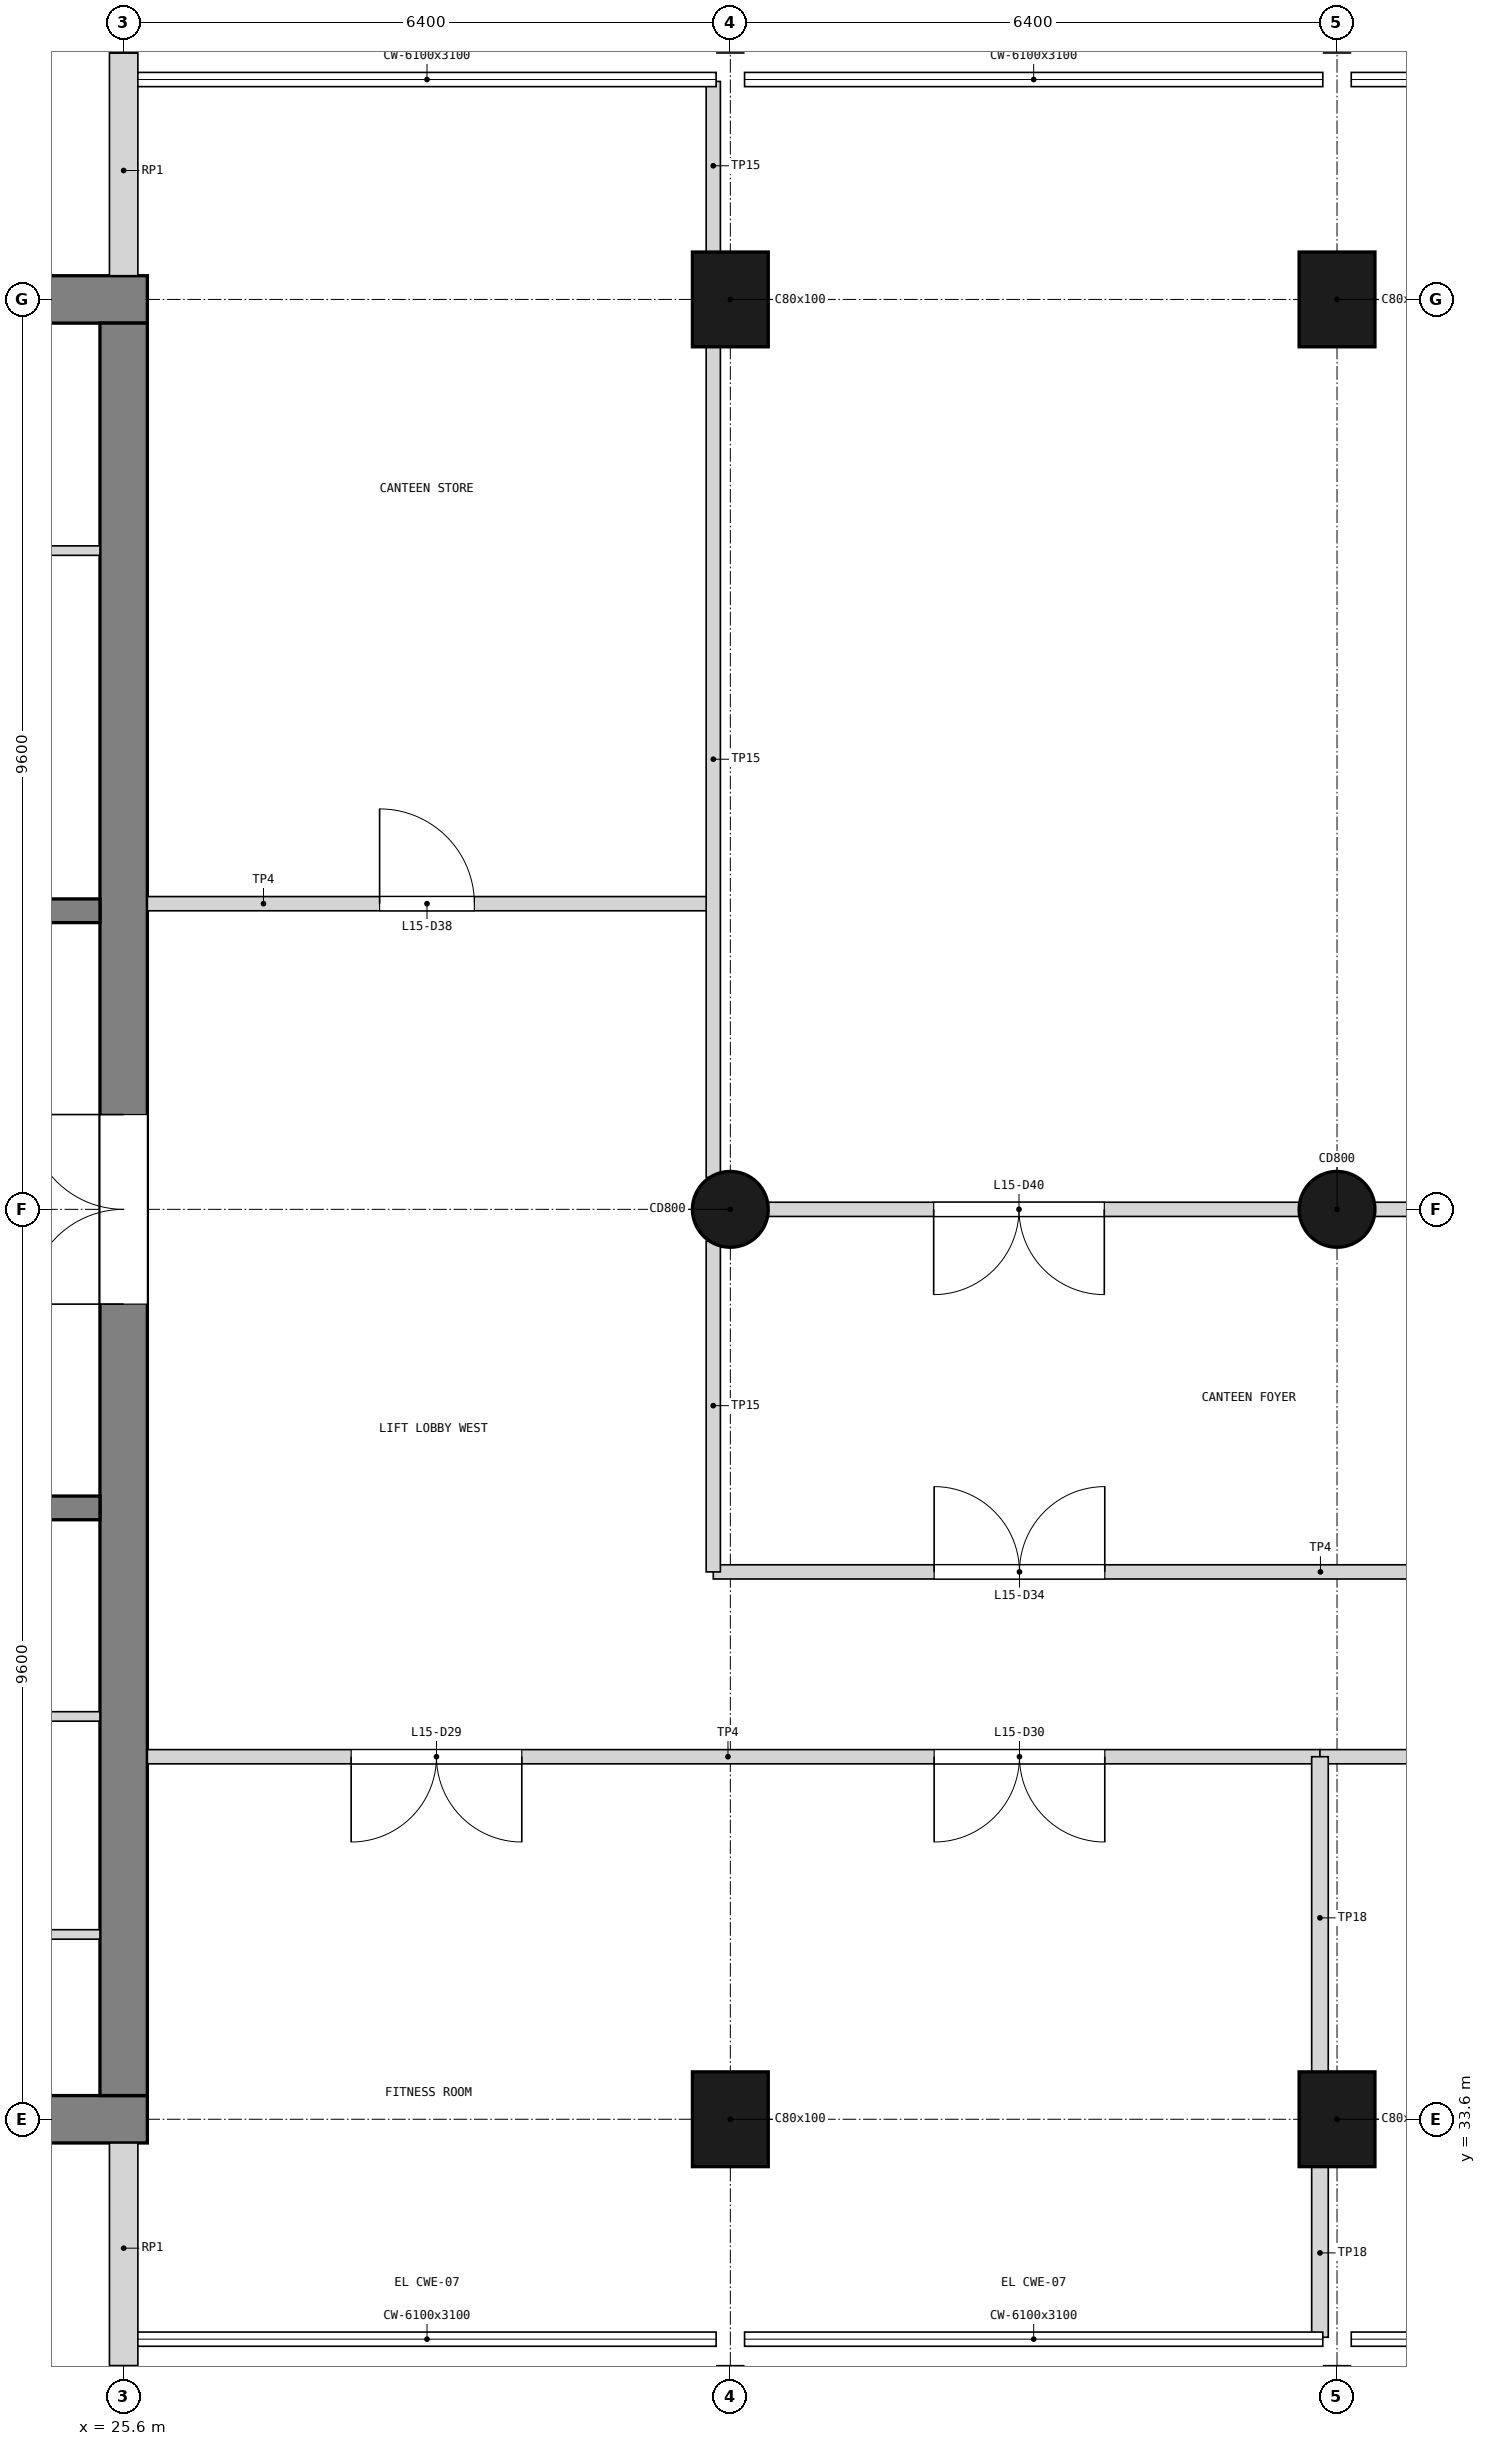
"""IFC4 building model, lengths in metres.
Left out: names, types, materials, properties, quantities, classifications, styles, units other than length and angle.
Written with IfcOpenShell. Run it as: python <this file> out.ifc"""

import sys

from ifc_helpers import new_model, si_unit, direction, frame, frame_2d, origin, origin_2d, place, context, subcontext, project, spatial, rectangle, circle, extrude, element, fill, save


model = new_model("IFC4")
c1 = context("Model", 3, precision=1e-05, world=origin(), true_north=direction((0.0, 1.0)))
c2 = subcontext(c1, "Body", "Model", "MODEL_VIEW")
j1 = project(units=[si_unit("LENGTHUNIT", "METRE"), si_unit("PLANEANGLEUNIT", "RADIAN")], contexts=[c1])
p1 = place(None, origin())
s1 = spatial("IfcSite", under=j1, at=p1, CompositionType="ELEMENT")
p2 = place(p1, origin())
s2 = spatial("IfcBuilding", under=s1, at=p2, CompositionType="ELEMENT")
p3 = place(p2, frame((0.0, 0.0, 60.0)))
s3 = spatial("IfcBuildingStorey", under=s2, at=p3, CompositionType="ELEMENT", Elevation=60.0)
p4 = place(p3, frame((12.55, 52.8, 0.0), z_axis=(0.0, 0.0, 1.0), x_axis=(1.0, 0.0, 0.0)))
e1 = element("IfcWall", 1, at=p4, inside=s3, PredefinedType="SHEAR", context=c2, shape_type="SweptSolid", body=[
    extrude(rectangle(XDim=13.3, YDim=0.5, at=frame_2d((6.65, 0.0))), origin(), (0.0, 0.0, 1.0), 4.2),
])
p5 = place(p4, frame((1.85, 0.0, 1.0)))
e2 = element("IfcOpeningElement", 2, at=p5, cuts=e1, PredefinedType="OPENING", context=c2, shape_type="SweptSolid", body=[
    extrude(rectangle(XDim=0.4, YDim=2.0, at=frame_2d((0.2, 1.0))), frame((0.0, 0.26, 0.0), z_axis=(0.0, -1.0, 0.0), x_axis=(1.0, 0.0, 0.0)), (0.0, 0.0, 1.0), 0.52),
])
p6 = place(p3, frame((12.55, 33.6, 0.0), z_axis=(0.0, 0.0, 1.0), x_axis=(1.0, 0.0, 0.0)))
e3 = element("IfcWall", 3, at=p6, inside=s3, PredefinedType="SHEAR", context=c2, shape_type="SweptSolid", body=[
    extrude(rectangle(XDim=13.3, YDim=0.5, at=frame_2d((6.65, 0.0))), origin(), (0.0, 0.0, 1.0), 4.2),
])
p7 = place(p6, frame((1.85, 0.0, 1.0)))
e4 = element("IfcOpeningElement", 4, at=p7, cuts=e3, PredefinedType="OPENING", context=c2, shape_type="SweptSolid", body=[
    extrude(rectangle(XDim=0.4, YDim=2.0, at=frame_2d((0.2, 1.0))), frame((0.0, 0.26, 0.0), z_axis=(0.0, -1.0, 0.0), x_axis=(1.0, 0.0, 0.0)), (0.0, 0.0, 1.0), 0.52),
])
p8 = place(p3, frame((25.6, 33.85, 0.0), z_axis=(0.0, 0.0, 1.0), x_axis=(0.0, 1.0, 0.0)))
e5 = element("IfcWall", 5, at=p8, inside=s3, PredefinedType="SHEAR", context=c2, shape_type="SweptSolid", body=[
    extrude(rectangle(XDim=18.7, YDim=0.5, at=frame_2d((9.35, 0.0))), origin(), (0.0, 0.0, 1.0), 4.2),
])
p9 = place(p8, frame((8.35, 0.0, 0.0)))
e6 = element("IfcOpeningElement", 6, at=p9, cuts=e5, PredefinedType="OPENING", context=c2, shape_type="SweptSolid", body=[
    extrude(rectangle(XDim=2.0, YDim=2.1, at=frame_2d((1.0, 1.05))), frame((0.0, 0.26, 0.0), z_axis=(0.0, -1.0, 0.0), x_axis=(1.0, 0.0, 0.0)), (0.0, 0.0, 1.0), 0.52),
])
p10 = place(p3, frame((32.0, 33.6, 0.0), z_axis=(0.0, 0.0, 1.0), x_axis=(1.0, 0.0, 0.0)))
e7 = element("IfcColumn", 7, at=p10, inside=s3, PredefinedType="COLUMN", context=c2, shape_type="SweptSolid", body=[
    extrude(rectangle(XDim=0.8, YDim=1.0, at=origin_2d()), origin(), (0.0, 0.0, 1.0), 4.2),
])
p11 = place(p3, frame((32.0, 43.2, 0.0), z_axis=(0.0, 0.0, 1.0), x_axis=(1.0, 0.0, 0.0)))
e8 = element("IfcColumn", 8, at=p11, inside=s3, PredefinedType="COLUMN", context=c2, shape_type="SweptSolid", body=[
    extrude(circle(Radius=0.4, at=origin_2d()), origin(), (0.0, 0.0, 1.0), 4.2),
])
for number, where, z_axis, x_axis in (
    (9, (32.0, 52.8, 0.0), (0.0, 0.0, 1.0), (1.0, 0.0, 0.0)),
    (10, (38.4, 33.6, 0.0), (0.0, 0.0, 1.0), (1.0, 0.0, 0.0)),
):
    element("IfcColumn", number, at=place(p3, frame(where, z_axis=z_axis, x_axis=x_axis)), inside=s3, PredefinedType="COLUMN", context=c2, shape_type="SweptSolid", body=[
        extrude(rectangle(XDim=0.8, YDim=1.0, at=origin_2d()), origin(), (0.0, 0.0, 1.0), 4.2),
    ])
p12 = place(p3, frame((38.4, 43.2, 0.0), z_axis=(0.0, 0.0, 1.0), x_axis=(1.0, 0.0, 0.0)))
e11 = element("IfcColumn", 11, at=p12, inside=s3, PredefinedType="COLUMN", context=c2, shape_type="SweptSolid", body=[
    extrude(circle(Radius=0.4, at=origin_2d()), origin(), (0.0, 0.0, 1.0), 4.2),
])
p13 = place(p3, frame((38.4, 52.8, 0.0), z_axis=(0.0, 0.0, 1.0), x_axis=(1.0, 0.0, 0.0)))
e12 = element("IfcColumn", 12, at=p13, inside=s3, PredefinedType="COLUMN", context=c2, shape_type="SweptSolid", body=[
    extrude(rectangle(XDim=0.8, YDim=1.0, at=origin_2d()), origin(), (0.0, 0.0, 1.0), 4.2),
])
p14 = place(p3, frame((25.6, 31.0, 0.0), z_axis=(0.0, 0.0, 1.0), x_axis=(0.0, 1.0, 0.0)))
e13 = element("IfcWall", 13, at=p14, inside=s3, PredefinedType="SOLIDWALL", context=c2, shape_type="SweptSolid", body=[
    extrude(rectangle(XDim=2.35, YDim=0.3, at=frame_2d((1.175, 0.0))), origin(), (0.0, 0.0, 1.0), 3.1),
])
p15 = place(p3, frame((25.6, 53.05, 0.0), z_axis=(0.0, 0.0, 1.0), x_axis=(0.0, 1.0, 0.0)))
e14 = element("IfcWall", 14, at=p15, inside=s3, PredefinedType="SOLIDWALL", context=c2, shape_type="SweptSolid", body=[
    extrude(rectangle(XDim=2.35, YDim=0.3, at=frame_2d((1.175, 0.0))), origin(), (0.0, 0.0, 1.0), 3.1),
])
for number, where, z_axis, x_axis in (
    (15, (19.875, 40.05, 0.0), (0.0, 0.0, 1.0), (1.0, 0.0, 0.0)),
    (16, (19.875, 46.35, 0.0), (0.0, 0.0, 1.0), (1.0, 0.0, 0.0)),
):
    element("IfcWall", number, at=place(p3, frame(where, z_axis=z_axis, x_axis=x_axis)), inside=s3, PredefinedType="SOLIDWALL", context=c2, shape_type="SweptSolid", body=[
        extrude(rectangle(XDim=5.475, YDim=0.25, at=frame_2d((2.738, 0.0))), origin(), (0.0, 0.0, 1.0), 3.9),
    ])
p16 = place(p3, frame((20.125, 35.55, 0.0), z_axis=(0.0, 0.0, 1.0), x_axis=(1.0, 0.0, 0.0)))
e17 = element("IfcWall", 17, at=p16, inside=s3, PredefinedType="PARTITIONING", context=c2, shape_type="SweptSolid", body=[
    extrude(rectangle(XDim=5.225, YDim=0.1, at=frame_2d((2.613, 0.0))), origin(), (0.0, 0.0, 1.0), 3.9),
])
p17 = place(p3, frame((21.675, 37.85, 0.0), z_axis=(0.0, 0.0, 1.0), x_axis=(1.0, 0.0, 0.0)))
e18 = element("IfcWall", 18, at=p17, inside=s3, PredefinedType="PARTITIONING", context=c2, shape_type="SweptSolid", body=[
    extrude(rectangle(XDim=3.675, YDim=0.1, at=frame_2d((1.837, 0.0))), origin(), (0.0, 0.0, 1.0), 3.9),
])
p18 = place(p3, frame((20.125, 50.15, 0.0), z_axis=(0.0, 0.0, 1.0), x_axis=(1.0, 0.0, 0.0)))
e19 = element("IfcWall", 19, at=p18, inside=s3, PredefinedType="PARTITIONING", context=c2, shape_type="SweptSolid", body=[
    extrude(rectangle(XDim=5.225, YDim=0.1, at=frame_2d((2.613, 0.0))), origin(), (0.0, 0.0, 1.0), 3.9),
])
p19 = place(p3, frame((25.85, 37.425, 0.0), z_axis=(0.0, 0.0, 1.0), x_axis=(1.0, 0.0, 0.0)))
e20 = element("IfcWall", 20, at=p19, inside=s3, PredefinedType="PARTITIONING", context=c2, shape_type="SweptSolid", body=[
    extrude(rectangle(XDim=12.37, YDim=0.15, at=frame_2d((6.185, 0.0))), origin(), (0.0, 0.0, 1.0), 3.9),
])
p20 = place(p19, frame((2.15, 0.0, 0.0)))
e21 = element("IfcOpeningElement", 21, at=p20, cuts=e20, PredefinedType="OPENING", context=c2, shape_type="SweptSolid", body=[
    extrude(rectangle(XDim=1.8, YDim=2.1, at=frame_2d((0.9, 1.05))), frame((0.0, 0.085, 0.0), z_axis=(0.0, -1.0, 0.0), x_axis=(1.0, 0.0, 0.0)), (0.0, 0.0, 1.0), 0.17),
])
p21 = place(p19, frame((8.3, 0.0, 0.0)))
e22 = element("IfcOpeningElement", 22, at=p21, cuts=e20, PredefinedType="OPENING", context=c2, shape_type="SweptSolid", body=[
    extrude(rectangle(XDim=1.8, YDim=2.1, at=frame_2d((0.9, 1.05))), frame((0.0, 0.085, 0.0), z_axis=(0.0, -1.0, 0.0), x_axis=(1.0, 0.0, 0.0)), (0.0, 0.0, 1.0), 0.17),
])
p22 = place(p3, frame((38.22, 37.425, 0.0), z_axis=(0.0, 0.0, 1.0), x_axis=(1.0, 0.0, 0.0)))
e23 = element("IfcWall", 23, at=p22, inside=s3, PredefinedType="PARTITIONING", context=c2, shape_type="SweptSolid", body=[
    extrude(rectangle(XDim=6.4, YDim=0.15, at=frame_2d((3.2, 0.0))), origin(), (0.0, 0.0, 1.0), 3.9),
])
p23 = place(p22, frame((2.73, 0.0, 0.0)))
e24 = element("IfcOpeningElement", 24, at=p23, cuts=e23, PredefinedType="OPENING", context=c2, shape_type="SweptSolid", body=[
    extrude(rectangle(XDim=1.0, YDim=2.1, at=frame_2d((0.5, 1.05))), frame((0.0, 0.085, 0.0), z_axis=(0.0, -1.0, 0.0), x_axis=(1.0, 0.0, 0.0)), (0.0, 0.0, 1.0), 0.17),
])
p24 = place(p3, frame((38.22, 31.3, 0.0), z_axis=(0.0, 0.0, 1.0), x_axis=(0.0, 1.0, 0.0)))
e25 = element("IfcWall", 25, at=p24, inside=s3, PredefinedType="PARTITIONING", context=c2, shape_type="SweptSolid", body=[
    extrude(rectangle(XDim=1.82, YDim=0.175, at=frame_2d((0.91, 0.0))), origin(), (0.0, 0.0, 1.0), 3.0),
])
p25 = place(p3, frame((38.22, 34.08, 0.0), z_axis=(0.0, 0.0, 1.0), x_axis=(0.0, 1.0, 0.0)))
e26 = element("IfcWall", 26, at=p25, inside=s3, PredefinedType="PARTITIONING", context=c2, shape_type="SweptSolid", body=[
    extrude(rectangle(XDim=3.345, YDim=0.175, at=frame_2d((1.672, 0.0))), origin(), (0.0, 0.0, 1.0), 3.0),
])
p26 = place(p3, frame((31.82, 39.375, 0.0), z_axis=(0.0, 0.0, 1.0), x_axis=(1.0, 0.0, 0.0)))
e27 = element("IfcWall", 27, at=p26, inside=s3, PredefinedType="PARTITIONING", context=c2, shape_type="SweptSolid", body=[
    extrude(rectangle(XDim=12.8, YDim=0.15, at=frame_2d((6.4, 0.0))), origin(), (0.0, 0.0, 1.0), 3.9),
])
p27 = place(p26, frame((2.33, 0.0, 0.0)))
e28 = element("IfcOpeningElement", 28, at=p27, cuts=e27, PredefinedType="OPENING", context=c2, shape_type="SweptSolid", body=[
    extrude(rectangle(XDim=1.8, YDim=2.1, at=frame_2d((0.9, 1.05))), frame((0.0, 0.085, 0.0), z_axis=(0.0, -1.0, 0.0), x_axis=(1.0, 0.0, 0.0)), (0.0, 0.0, 1.0), 0.17),
])
p28 = place(p26, frame((8.68, 0.0, 0.0)))
e29 = element("IfcOpeningElement", 29, at=p28, cuts=e27, PredefinedType="OPENING", context=c2, shape_type="SweptSolid", body=[
    extrude(rectangle(XDim=1.8, YDim=2.1, at=frame_2d((0.9, 1.05))), frame((0.0, 0.085, 0.0), z_axis=(0.0, -1.0, 0.0), x_axis=(1.0, 0.0, 0.0)), (0.0, 0.0, 1.0), 0.17),
])
p29 = place(p3, frame((31.82, 43.2, 0.0), z_axis=(0.0, 0.0, 1.0), x_axis=(1.0, 0.0, 0.0)))
e30 = element("IfcWall", 30, at=p29, inside=s3, PredefinedType="PARTITIONING", context=c2, shape_type="SweptSolid", body=[
    extrude(rectangle(XDim=25.96, YDim=0.15, at=frame_2d((12.98, 0.0))), origin(), (0.0, 0.0, 1.0), 3.1),
])
p30 = place(p29, frame((2.325, 0.0, 0.0)))
e31 = element("IfcOpeningElement", 31, at=p30, cuts=e30, PredefinedType="OPENING", context=c2, shape_type="SweptSolid", body=[
    extrude(rectangle(XDim=1.8, YDim=2.1, at=frame_2d((0.9, 1.05))), frame((0.0, 0.085, 0.0), z_axis=(0.0, -1.0, 0.0), x_axis=(1.0, 0.0, 0.0)), (0.0, 0.0, 1.0), 0.17),
])
p31 = place(p29, frame((8.675, 0.0, 0.0)))
e32 = element("IfcOpeningElement", 32, at=p31, cuts=e30, PredefinedType="OPENING", context=c2, shape_type="SweptSolid", body=[
    extrude(rectangle(XDim=1.8, YDim=2.1, at=frame_2d((0.9, 1.05))), frame((0.0, 0.085, 0.0), z_axis=(0.0, -1.0, 0.0), x_axis=(1.0, 0.0, 0.0)), (0.0, 0.0, 1.0), 0.17),
])
p32 = place(p29, frame((22.285, 0.0, 0.0)))
e33 = element("IfcOpeningElement", 33, at=p32, cuts=e30, PredefinedType="OPENING", context=c2, shape_type="SweptSolid", body=[
    extrude(rectangle(XDim=1.0, YDim=2.1, at=frame_2d((0.5, 1.05))), frame((0.0, 0.085, 0.0), z_axis=(0.0, -1.0, 0.0), x_axis=(1.0, 0.0, 0.0)), (0.0, 0.0, 1.0), 0.17),
])
p33 = place(p3, frame((25.85, 46.425, 0.0), z_axis=(0.0, 0.0, 1.0), x_axis=(1.0, 0.0, 0.0)))
e34 = element("IfcWall", 34, at=p33, inside=s3, PredefinedType="PARTITIONING", context=c2, shape_type="SweptSolid", body=[
    extrude(rectangle(XDim=5.97, YDim=0.15, at=frame_2d((2.985, 0.0))), origin(), (0.0, 0.0, 1.0), 3.9),
])
p34 = place(p33, frame((2.45, 0.0, 0.0)))
e35 = element("IfcOpeningElement", 35, at=p34, cuts=e34, PredefinedType="OPENING", context=c2, shape_type="SweptSolid", body=[
    extrude(rectangle(XDim=1.0, YDim=2.1, at=frame_2d((0.5, 1.05))), frame((0.0, 0.085, 0.0), z_axis=(0.0, -1.0, 0.0), x_axis=(1.0, 0.0, 0.0)), (0.0, 0.0, 1.0), 0.17),
])
p35 = place(p3, frame((31.82, 39.375, 0.0), z_axis=(0.0, 0.0, 1.0), x_axis=(0.0, 1.0, 0.0)))
e36 = element("IfcWall", 36, at=p35, inside=s3, PredefinedType="PARTITIONING", context=c2, shape_type="SweptSolid", body=[
    extrude(rectangle(XDim=3.488, YDim=0.15, at=frame_2d((1.744, 0.0))), origin(), (0.0, 0.0, 1.0), 3.0),
])
p36 = place(p3, frame((31.82, 43.537, 0.0), z_axis=(0.0, 0.0, 1.0), x_axis=(0.0, 1.0, 0.0)))
e37 = element("IfcWall", 37, at=p36, inside=s3, PredefinedType="PARTITIONING", context=c2, shape_type="SweptSolid", body=[
    extrude(rectangle(XDim=8.783, YDim=0.15, at=frame_2d((4.392, 0.0))), origin(), (0.0, 0.0, 1.0), 3.0),
])
p37 = place(p3, frame((31.82, 53.28, 0.0), z_axis=(0.0, 0.0, 1.0), x_axis=(0.0, 1.0, 0.0)))
e38 = element("IfcWall", 38, at=p37, inside=s3, PredefinedType="PARTITIONING", context=c2, shape_type="SweptSolid", body=[
    extrude(rectangle(XDim=1.82, YDim=0.15, at=frame_2d((0.91, 0.0))), origin(), (0.0, 0.0, 1.0), 3.0),
])
p38 = place(p9, origin())
e39 = element("IfcDoor", 39, at=p38, inside=s3, OperationType="DOUBLE_DOOR_SINGLE_SWING", PredefinedType="DOOR", context=c2, shape_type="SweptSolid", body=[
    extrude(rectangle(XDim=2.0, YDim=2.1, at=frame_2d((1.0, 1.05))), frame((0.0, 0.025, 0.0), z_axis=(0.0, -1.0, 0.0), x_axis=(1.0, 0.0, 0.0)), (0.0, 0.0, 1.0), 0.05),
])
fill(e6, e39)
p39 = place(p20, frame((1.8, 0.0, 0.0), z_axis=(0.0, 0.0, 1.0), x_axis=(-1.0, 0.0, 0.0)))
e40 = element("IfcDoor", 40, at=p39, inside=s3, OperationType="DOUBLE_DOOR_SINGLE_SWING", PredefinedType="DOOR", context=c2, shape_type="SweptSolid", body=[
    extrude(rectangle(XDim=1.8, YDim=2.1, at=frame_2d((0.9, 1.05))), frame((0.0, 0.025, 0.0), z_axis=(0.0, -1.0, 0.0), x_axis=(1.0, 0.0, 0.0)), (0.0, 0.0, 1.0), 0.05),
])
fill(e21, e40)
p40 = place(p21, frame((1.8, 0.0, 0.0), z_axis=(0.0, 0.0, 1.0), x_axis=(-1.0, 0.0, 0.0)))
e41 = element("IfcDoor", 41, at=p40, inside=s3, OperationType="DOUBLE_DOOR_SINGLE_SWING", PredefinedType="DOOR", context=c2, shape_type="SweptSolid", body=[
    extrude(rectangle(XDim=1.8, YDim=2.1, at=frame_2d((0.9, 1.05))), frame((0.0, 0.025, 0.0), z_axis=(0.0, -1.0, 0.0), x_axis=(1.0, 0.0, 0.0)), (0.0, 0.0, 1.0), 0.05),
])
fill(e22, e41)
p41 = place(p27, origin())
e42 = element("IfcDoor", 42, at=p41, inside=s3, OperationType="DOUBLE_DOOR_SINGLE_SWING", PredefinedType="DOOR", context=c2, shape_type="SweptSolid", body=[
    extrude(rectangle(XDim=1.8, YDim=2.1, at=frame_2d((0.9, 1.05))), frame((0.0, 0.025, 0.0), z_axis=(0.0, -1.0, 0.0), x_axis=(1.0, 0.0, 0.0)), (0.0, 0.0, 1.0), 0.05),
])
fill(e28, e42)
p42 = place(p34, origin())
e43 = element("IfcDoor", 43, at=p42, inside=s3, OperationType="SINGLE_SWING_LEFT", PredefinedType="DOOR", context=c2, shape_type="SweptSolid", body=[
    extrude(rectangle(XDim=1.0, YDim=2.1, at=frame_2d((0.5, 1.05))), frame((0.0, 0.025, 0.0), z_axis=(0.0, -1.0, 0.0), x_axis=(1.0, 0.0, 0.0)), (0.0, 0.0, 1.0), 0.05),
])
fill(e35, e43)
p43 = place(p30, frame((1.8, 0.0, 0.0), z_axis=(0.0, 0.0, 1.0), x_axis=(-1.0, 0.0, 0.0)))
e44 = element("IfcDoor", 44, at=p43, inside=s3, OperationType="DOUBLE_DOOR_SINGLE_SWING", PredefinedType="DOOR", context=c2, shape_type="SweptSolid", body=[
    extrude(rectangle(XDim=1.8, YDim=2.1, at=frame_2d((0.9, 1.05))), frame((0.0, 0.025, 0.0), z_axis=(0.0, -1.0, 0.0), x_axis=(1.0, 0.0, 0.0)), (0.0, 0.0, 1.0), 0.05),
])
fill(e31, e44)
save(model, sys.argv[1])
